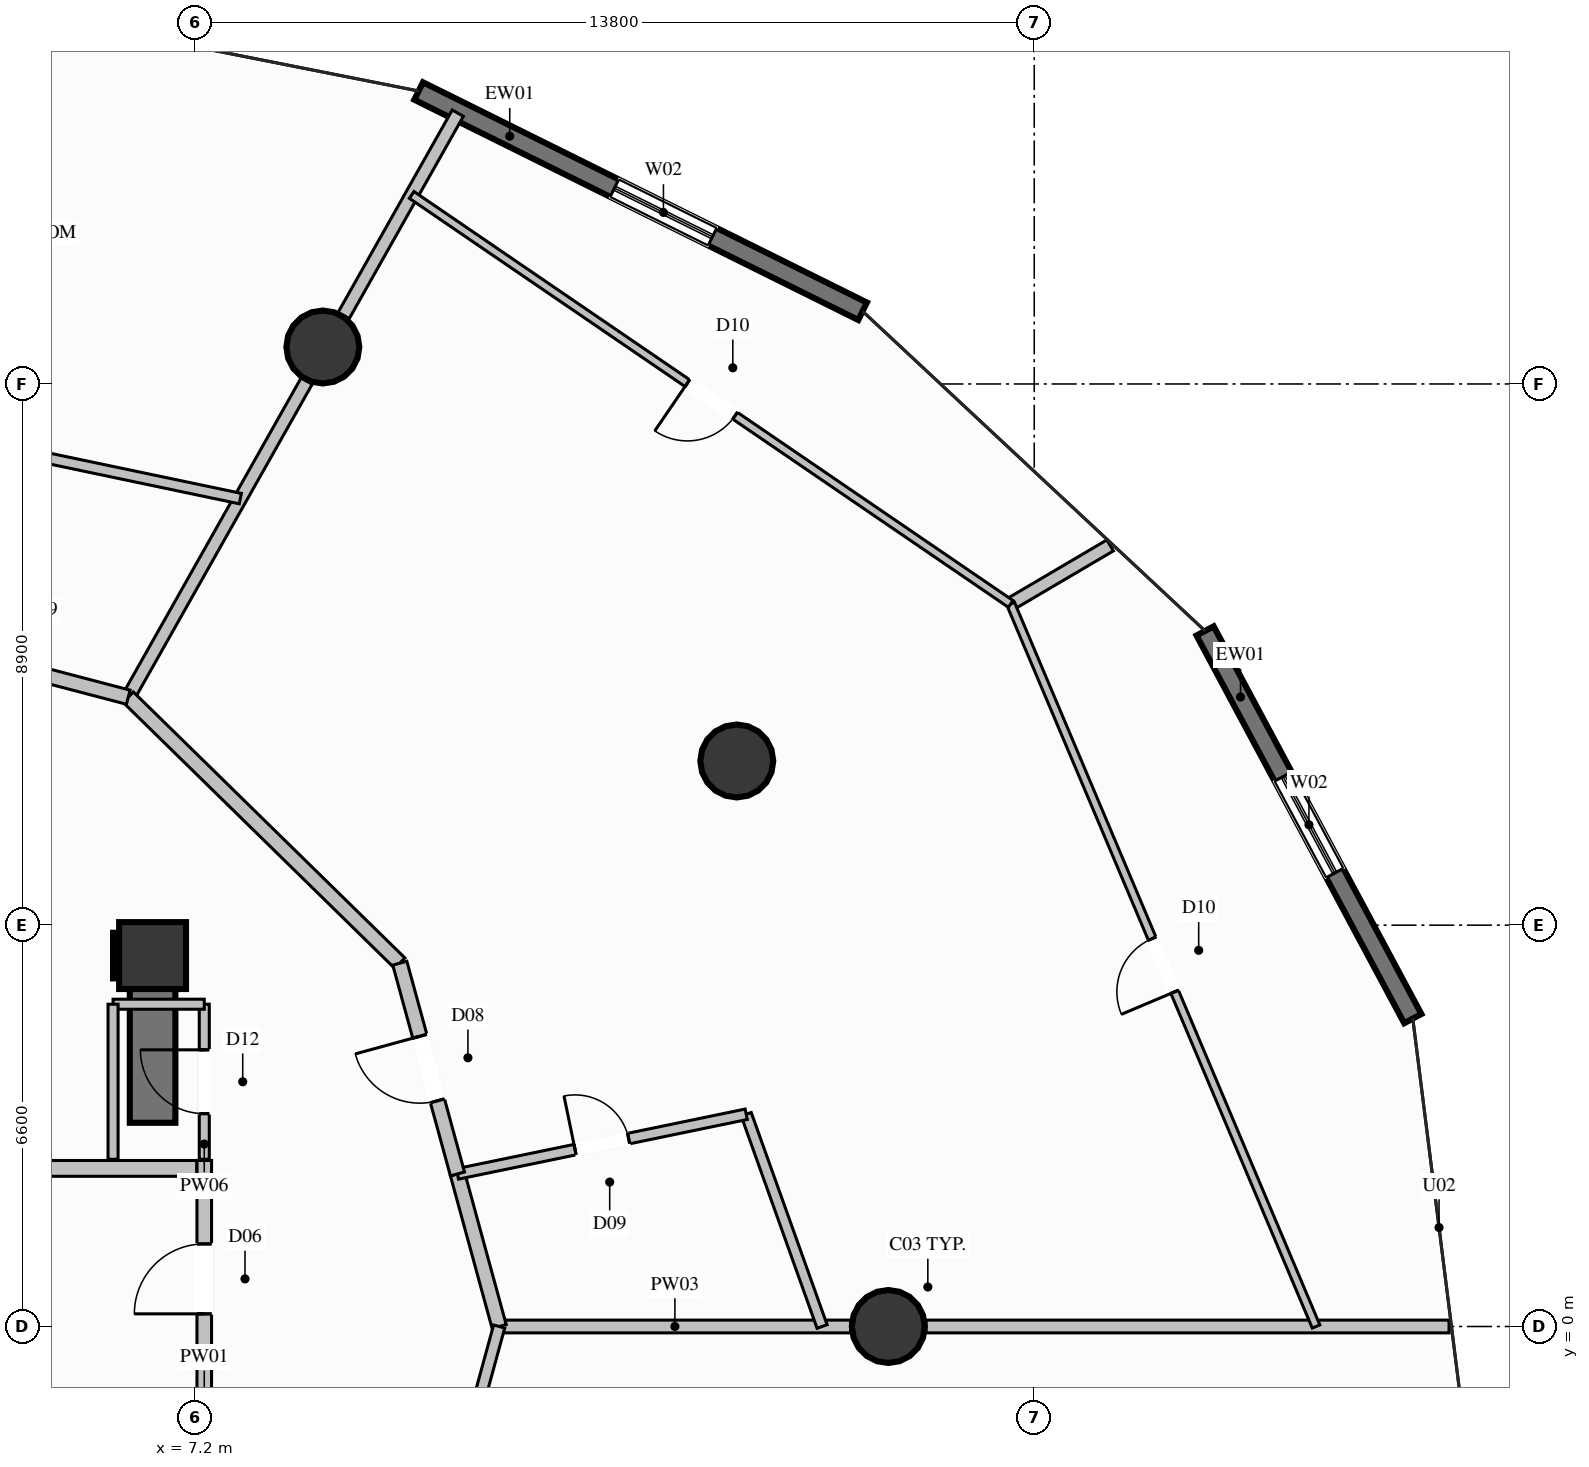
"""IFC4 building model, lengths in metres.
Left out: names, types, materials, properties, quantities, classifications, styles, units other than length and angle.
Written with IfcOpenShell. Run it as: python <this file> out.ifc"""

import sys

from ifc_helpers import new_model, si_unit, direction, frame, frame_2d, origin, origin_2d, place, context, subcontext, project, spatial, rectangle, circle, extrude, element, fill, save


model = new_model("IFC4")
c1 = context("Model", 3, precision=1e-05, world=origin(), true_north=direction((0.0, 1.0)))
c2 = subcontext(c1, "Body", "Model", "MODEL_VIEW")
j1 = project(units=[si_unit("LENGTHUNIT", "METRE"), si_unit("PLANEANGLEUNIT", "RADIAN")], contexts=[c1])
p1 = place(None, origin())
s1 = spatial("IfcSite", under=j1, at=p1, CompositionType="ELEMENT")
p2 = place(p1, origin())
s2 = spatial("IfcBuilding", under=s1, at=p2, CompositionType="ELEMENT")
p3 = place(p2, frame((0.0, 0.0, 35.6)))
s3 = spatial("IfcBuildingStorey", under=s2, at=p3, CompositionType="ELEMENT", Elevation=35.6)
p4 = place(p3, frame((6.5, 6.1, 0.0), z_axis=(0.0, 0.0, 1.0), x_axis=(1.0, 0.0, 0.0)))
e1 = element("IfcColumn", 1, at=p4, inside=s3, PredefinedType="COLUMN", context=c2, shape_type="SweptSolid", body=[
    extrude(rectangle(XDim=1.1, YDim=1.1, at=origin_2d()), origin(), (0.0, 0.0, 1.0), 3.6),
])
p5 = place(p3, frame((5.85, 6.1, 0.0), z_axis=(0.0, 0.0, 1.0), x_axis=(1.0, 0.0, 0.0)))
e2 = element("IfcWall", 2, at=p5, inside=s3, PredefinedType="SHEAR", context=c2, shape_type="SweptSolid", body=[
    extrude(rectangle(XDim=0.275, YDim=0.75, at=frame_2d((0.137, 0.0))), origin(), (0.0, 0.0, 1.0), 3.6),
])
p6 = place(p3, frame((6.5, 3.35, 0.0), z_axis=(0.0, 0.0, 1.0), x_axis=(0.0, 1.0, 0.0)))
e3 = element("IfcWall", 3, at=p6, inside=s3, PredefinedType="SHEAR", context=c2, shape_type="SweptSolid", body=[
    extrude(rectangle(XDim=3.125, YDim=0.75, at=frame_2d((1.562, 0.0))), origin(), (0.0, 0.0, 1.0), 3.6),
])
for number, where, z_axis, x_axis in (
    (4, (18.6, 0.0, 0.0), (0.0, 0.0, 1.0), (1.0, 0.0, 0.0)),
    (5, (16.108, 9.3, 0.0), (0.0, 0.0, 1.0), (1.0, 0.0, 0.0)),
    (6, (9.3, 16.108, 0.0), (0.0, 0.0, 1.0), (1.0, 0.0, 0.0)),
):
    element("IfcColumn", number, at=place(p3, frame(where, z_axis=z_axis, x_axis=x_axis)), inside=s3, PredefinedType="COLUMN", context=c2, shape_type="SweptSolid", body=[
        extrude(circle(Radius=0.6, at=origin_2d()), origin(), (0.0, 0.0, 1.0), 3.6),
    ])
p7 = place(p3, frame((23.81, 11.439, 0.0), z_axis=(0.0, 0.0, 1.0), x_axis=(0.472255130515, -0.881461905985, 0.0)))
e7 = element("IfcWall", 7, at=p7, inside=s3, PredefinedType="SOLIDWALL", context=c2, shape_type="SweptSolid", body=[
    extrude(rectangle(XDim=7.233, YDim=0.32, at=frame_2d((3.617, 0.0))), origin(), (0.0, 0.0, 1.0), 3.34),
])
p8 = place(p7, frame((2.717, 0.0, 0.35)))
e8 = element("IfcOpeningElement", 8, at=p8, cuts=e7, PredefinedType="OPENING", context=c2, shape_type="SweptSolid", body=[
    extrude(rectangle(XDim=1.8, YDim=2.6, at=frame_2d((0.9, 1.3))), frame((0.0, 0.17, 0.0), z_axis=(0.0, -1.0, 0.0), x_axis=(1.0, 0.0, 0.0)), (0.0, 0.0, 1.0), 0.34),
])
p9 = place(p3, frame((10.876, 20.318, 0.0), z_axis=(0.0, 0.0, 1.0), x_axis=(0.895818759339, -0.444419565743, 0.0)))
e9 = element("IfcWall", 9, at=p9, inside=s3, PredefinedType="SOLIDWALL", context=c2, shape_type="SweptSolid", body=[
    extrude(rectangle(XDim=8.15, YDim=0.32, at=frame_2d((4.075, 0.0))), origin(), (0.0, 0.0, 1.0), 3.34),
])
p10 = place(p9, frame((3.594, 0.0, 0.35)))
e10 = element("IfcOpeningElement", 10, at=p10, cuts=e9, PredefinedType="OPENING", context=c2, shape_type="SweptSolid", body=[
    extrude(rectangle(XDim=1.8, YDim=2.6, at=frame_2d((0.9, 1.3))), frame((0.0, 0.17, 0.0), z_axis=(0.0, -1.0, 0.0), x_axis=(1.0, 0.0, 0.0)), (0.0, 0.0, 1.0), 0.34),
])
p11 = place(p3, frame((7.35, -2.34, 0.0), z_axis=(0.0, 0.0, 1.0), x_axis=(0.0, 1.0, 0.0)))
e11 = element("IfcWall", 11, at=p11, inside=s3, PredefinedType="PARTITIONING", context=c2, shape_type="SweptSolid", body=[
    extrude(rectangle(XDim=5.07, YDim=0.24, at=frame_2d((2.535, 0.0))), origin(), (0.0, 0.0, 1.0), 2.425),
])
p12 = place(p11, frame((2.548, 0.0, 0.0)))
e12 = element("IfcOpeningElement", 12, at=p12, cuts=e11, PredefinedType="OPENING", context=c2, shape_type="SweptSolid", body=[
    extrude(rectangle(XDim=1.15, YDim=2.2, at=frame_2d((0.575, 1.1))), frame((0.0, 0.13, 0.0), z_axis=(0.0, -1.0, 0.0), x_axis=(1.0, 0.0, 0.0)), (0.0, 0.0, 1.0), 0.26),
])
p13 = place(p3, frame((4.13, 2.6, 0.0), z_axis=(0.0, 0.0, 1.0), x_axis=(1.0, 0.0, 0.0)))
e13 = element("IfcWall", 13, at=p13, inside=s3, PredefinedType="PARTITIONING", context=c2, shape_type="SweptSolid", body=[
    extrude(rectangle(XDim=3.095, YDim=0.26, at=frame_2d((1.548, 0.0))), origin(), (0.0, 0.0, 1.0), 3.34),
])
p14 = place(p3, frame((7.35, 2.75, 0.0), z_axis=(0.0, 0.0, 1.0), x_axis=(0.0, 1.0, 0.0)))
e14 = element("IfcWall", 14, at=p14, inside=s3, PredefinedType="PARTITIONING", context=c2, shape_type="SweptSolid", body=[
    extrude(rectangle(XDim=2.55, YDim=0.165, at=frame_2d((1.275, 0.0))), origin(), (0.0, 0.0, 1.0), 3.34),
])
p15 = place(p14, frame((0.75, 0.0, 0.0)))
e15 = element("IfcOpeningElement", 15, at=p15, cuts=e14, PredefinedType="OPENING", context=c2, shape_type="SweptSolid", body=[
    extrude(rectangle(XDim=1.05, YDim=2.15, at=frame_2d((0.525, 1.075))), frame((0.0, 0.093, 0.0), z_axis=(0.0, -1.0, 0.0), x_axis=(1.0, 0.0, 0.0)), (0.0, 0.0, 1.0), 0.185),
])
p16 = place(p3, frame((7.35, 5.3, 0.0), z_axis=(0.0, 0.0, 1.0), x_axis=(-1.0, 0.0, 0.0)))
e16 = element("IfcWall", 16, at=p16, inside=s3, PredefinedType="PARTITIONING", context=c2, shape_type="SweptSolid", body=[
    extrude(rectangle(XDim=1.5, YDim=0.165, at=frame_2d((0.75, 0.0))), origin(), (0.0, 0.0, 1.0), 2.425),
])
p17 = place(p3, frame((5.85, 5.3, 0.0), z_axis=(0.0, 0.0, 1.0), x_axis=(0.0, -1.0, 0.0)))
e17 = element("IfcWall", 17, at=p17, inside=s3, PredefinedType="PARTITIONING", context=c2, shape_type="SweptSolid", body=[
    extrude(rectangle(XDim=2.55, YDim=0.165, at=frame_2d((1.275, 0.0))), origin(), (0.0, 0.0, 1.0), 2.425),
])
p18 = place(p3, frame((12.2, 0.0, 0.0), z_axis=(0.0, 0.0, 1.0), x_axis=(1.0, 0.0, 0.0)))
e18 = element("IfcWall", 18, at=p18, inside=s3, PredefinedType="PARTITIONING", context=c2, shape_type="SweptSolid", body=[
    extrude(rectangle(XDim=5.78, YDim=0.21, at=frame_2d((2.89, 0.0))), origin(), (0.0, 0.0, 1.0), 2.707),
])
p19 = place(p3, frame((19.22, 0.0, 0.0), z_axis=(0.0, 0.0, 1.0), x_axis=(1.0, 0.0, 0.0)))
e19 = element("IfcWall", 19, at=p19, inside=s3, PredefinedType="PARTITIONING", context=c2, shape_type="SweptSolid", body=[
    extrude(rectangle(XDim=8.602, YDim=0.21, at=frame_2d((4.301, 0.0))), origin(), (0.0, 0.0, 1.0), 3.34),
])
p20 = place(p3, frame((6.1, 10.349, 0.0), z_axis=(0.0, 0.0, 1.0), x_axis=(0.491458802648, 0.870900824032, 0.0)))
e20 = element("IfcWall", 20, at=p20, inside=s3, PredefinedType="PARTITIONING", context=c2, shape_type="SweptSolid", body=[
    extrude(rectangle(XDim=5.97, YDim=0.21, at=frame_2d((2.985, 0.0))), origin(), (0.0, 0.0, 1.0), 2.707),
])
p21 = place(p3, frame((9.642, 16.625, 0.0), z_axis=(0.0, 0.0, 1.0), x_axis=(0.491316217202, 0.870981271161, 0.0)))
e21 = element("IfcWall", 21, at=p21, inside=s3, PredefinedType="PARTITIONING", context=c2, shape_type="SweptSolid", body=[
    extrude(rectangle(XDim=3.822, YDim=0.21, at=frame_2d((1.911, 0.0))), origin(), (0.0, 0.0, 1.0), 3.34),
])
p22 = place(p3, frame((12.2, 0.0, 0.0), z_axis=(0.0, 0.0, 1.0), x_axis=(-0.263744763784, 0.964592504416, 0.0)))
e22 = element("IfcWall", 22, at=p22, inside=s3, PredefinedType="PARTITIONING", context=c2, shape_type="SweptSolid", body=[
    extrude(rectangle(XDim=2.601, YDim=0.24, at=frame_2d((1.301, 0.0))), origin(), (0.0, 0.0, 1.0), 2.917),
])
p23 = place(p3, frame((17.511, 0.0, 0.0), z_axis=(0.0, 0.0, 1.0), x_axis=(-0.336724431673, 0.94160323763, 0.0)))
e23 = element("IfcWall", 23, at=p23, inside=s3, PredefinedType="PLUMBINGWALL", context=c2, shape_type="SweptSolid", body=[
    extrude(rectangle(XDim=3.707, YDim=0.175, at=frame_2d((1.853, 0.0))), origin(), (0.0, 0.0, 1.0), 3.34),
])
p24 = place(p3, frame((11.514, 2.509, 0.0), z_axis=(0.0, 0.0, 1.0), x_axis=(0.979325812174, 0.202289281992, 0.0)))
e24 = element("IfcWall", 24, at=p24, inside=s3, PredefinedType="PLUMBINGWALL", context=c2, shape_type="SweptSolid", body=[
    extrude(rectangle(XDim=4.849, YDim=0.175, at=frame_2d((2.425, 0.0))), origin(), (0.0, 0.0, 1.0), 3.34),
])
p25 = place(p24, frame((1.975, 0.0, 0.0)))
e25 = element("IfcOpeningElement", 25, at=p25, cuts=e24, PredefinedType="OPENING", context=c2, shape_type="SweptSolid", body=[
    extrude(rectangle(XDim=0.9, YDim=2.1, at=frame_2d((0.45, 1.05))), frame((0.0, 0.098, 0.0), z_axis=(0.0, -1.0, 0.0), x_axis=(1.0, 0.0, 0.0)), (0.0, 0.0, 1.0), 0.195),
])
p26 = place(p3, frame((20.613, 11.883, 0.0), z_axis=(0.0, 0.0, 1.0), x_axis=(0.861901128596, 0.507076369519, 0.0)))
e26 = element("IfcWall", 26, at=p26, inside=s3, PredefinedType="PARTITIONING", context=c2, shape_type="SweptSolid", body=[
    extrude(rectangle(XDim=1.897, YDim=0.21, at=frame_2d((0.948, 0.0))), origin(), (0.0, 0.0, 1.0), 3.34),
])
p27 = place(p3, frame((10.566, 5.975, 0.0), z_axis=(0.0, 0.0, 1.0), x_axis=(-0.714411174131, 0.699726142342, 0.0)))
e27 = element("IfcWall", 27, at=p27, inside=s3, PredefinedType="PARTITIONING", context=c2, shape_type="SweptSolid", body=[
    extrude(rectangle(XDim=6.251, YDim=0.24, at=frame_2d((3.125, 0.0))), origin(), (0.0, 0.0, 1.0), 3.34),
])
p28 = place(p3, frame((11.514, 2.509, 0.0), z_axis=(0.0, 0.0, 1.0), x_axis=(-0.263818706543, 0.96457228349, 0.0)))
e28 = element("IfcWall", 28, at=p28, inside=s3, PredefinedType="PARTITIONING", context=c2, shape_type="SweptSolid", body=[
    extrude(rectangle(XDim=3.593, YDim=0.24, at=frame_2d((1.797, 0.0))), origin(), (0.0, 0.0, 1.0), 2.917),
])
p29 = place(p28, frame((1.247, 0.0, 0.0)))
e29 = element("IfcOpeningElement", 29, at=p29, cuts=e28, PredefinedType="OPENING", context=c2, shape_type="SweptSolid", body=[
    extrude(rectangle(XDim=1.1, YDim=2.3, at=frame_2d((0.55, 1.15))), frame((0.0, 0.13, 0.0), z_axis=(0.0, -1.0, 0.0), x_axis=(1.0, 0.0, 0.0)), (0.0, 0.0, 1.0), 0.26),
])
p30 = place(p3, frame((25.635, 0.0, 0.0), z_axis=(0.0, 0.0, 1.0), x_axis=(-0.389280036571, 0.921119456491, 0.0)))
e30 = element("IfcWall", 30, at=p30, inside=s3, PredefinedType="PARTITIONING", context=c2, shape_type="SweptSolid", body=[
    extrude(rectangle(XDim=12.901, YDim=0.135, at=frame_2d((6.45, 0.0))), origin(), (0.0, 0.0, 1.0), 3.34),
])
p31 = place(p30, frame((5.975, 0.0, 0.0)))
e31 = element("IfcOpeningElement", 31, at=p31, cuts=e30, PredefinedType="OPENING", context=c2, shape_type="SweptSolid", body=[
    extrude(rectangle(XDim=0.95, YDim=2.1, at=frame_2d((0.475, 1.05))), frame((0.0, 0.078, 0.0), z_axis=(0.0, -1.0, 0.0), x_axis=(1.0, 0.0, 0.0)), (0.0, 0.0, 1.0), 0.155),
])
p32 = place(p3, frame((20.613, 11.883, 0.0), z_axis=(0.0, 0.0, 1.0), x_axis=(-0.825894658533, 0.563824452295, 0.0)))
e32 = element("IfcWall", 32, at=p32, inside=s3, PredefinedType="PARTITIONING", context=c2, shape_type="SweptSolid", body=[
    extrude(rectangle(XDim=11.929, YDim=0.135, at=frame_2d((5.964, 0.0))), origin(), (0.0, 0.0, 1.0), 3.34),
])
p33 = place(p32, frame((5.489, 0.0, 0.0)))
e33 = element("IfcOpeningElement", 33, at=p33, cuts=e32, PredefinedType="OPENING", context=c2, shape_type="SweptSolid", body=[
    extrude(rectangle(XDim=0.95, YDim=2.1, at=frame_2d((0.475, 1.05))), frame((0.0, 0.078, 0.0), z_axis=(0.0, -1.0, 0.0), x_axis=(1.0, 0.0, 0.0)), (0.0, 0.0, 1.0), 0.155),
])
p34 = place(p3, frame((6.1, 10.349, 0.0), z_axis=(0.0, 0.0, 1.0), x_axis=(-0.967291490053, 0.253667446219, 0.0)))
e34 = element("IfcWall", 34, at=p34, inside=s3, PredefinedType="PARTITIONING", context=c2, shape_type="SweptSolid", body=[
    extrude(rectangle(XDim=2.649, YDim=0.24, at=frame_2d((1.324, 0.0))), origin(), (0.0, 0.0, 1.0), 3.34),
])
p35 = place(p3, frame((7.943, 13.615, 0.0), z_axis=(0.0, 0.0, 1.0), x_axis=(-0.978691652986, 0.205335453283, 0.0)))
e35 = element("IfcWall", 35, at=p35, inside=s3, PredefinedType="PLUMBINGWALL", context=c2, shape_type="SweptSolid", body=[
    extrude(rectangle(XDim=3.409, YDim=0.175, at=frame_2d((1.705, 0.0))), origin(), (0.0, 0.0, 1.0), 3.34),
])
p36 = place(p3, frame((10.566, -5.975, 0.0), z_axis=(0.0, 0.0, 1.0), x_axis=(0.263787657435, 0.964580775148, 0.0)))
e36 = element("IfcWall", 36, at=p36, inside=s3, PredefinedType="PARTITIONING", context=c2, shape_type="SweptSolid", body=[
    extrude(rectangle(XDim=6.195, YDim=0.19, at=frame_2d((3.097, 0.0))), origin(), (0.0, 0.0, 1.0), 2.917),
])
p37 = place(p36, frame((2.622, 0.0, 0.0)))
e37 = element("IfcOpeningElement", 37, at=p37, cuts=e36, PredefinedType="OPENING", context=c2, shape_type="SweptSolid", body=[
    extrude(rectangle(XDim=0.95, YDim=2.1, at=frame_2d((0.475, 1.05))), frame((0.0, 0.105, 0.0), z_axis=(0.0, -1.0, 0.0), x_axis=(1.0, 0.0, 0.0)), (0.0, 0.0, 1.0), 0.21),
])
p38 = place(p8, origin())
e38 = element("IfcWindow", 38, at=p38, inside=s3, PartitioningType="SINGLE_PANEL", PredefinedType="WINDOW", context=c2, shape_type="SweptSolid", body=[
    extrude(rectangle(XDim=1.8, YDim=2.6, at=frame_2d((0.9, 1.3))), frame((0.0, 0.03, 0.0), z_axis=(0.0, -1.0, 0.0), x_axis=(1.0, 0.0, 0.0)), (0.0, 0.0, 1.0), 0.06),
])
fill(e8, e38)
p39 = place(p10, origin())
e39 = element("IfcWindow", 39, at=p39, inside=s3, PartitioningType="SINGLE_PANEL", PredefinedType="WINDOW", context=c2, shape_type="SweptSolid", body=[
    extrude(rectangle(XDim=1.8, YDim=2.6, at=frame_2d((0.9, 1.3))), frame((0.0, 0.03, 0.0), z_axis=(0.0, -1.0, 0.0), x_axis=(1.0, 0.0, 0.0)), (0.0, 0.0, 1.0), 0.06),
])
fill(e10, e39)
p40 = place(p12, origin())
e40 = element("IfcDoor", 40, at=p40, inside=s3, OperationType="SINGLE_SWING_LEFT", PredefinedType="DOOR", context=c2, shape_type="SweptSolid", body=[
    extrude(rectangle(XDim=1.15, YDim=2.2, at=frame_2d((0.575, 1.1))), frame((0.0, 0.025, 0.0), z_axis=(0.0, -1.0, 0.0), x_axis=(1.0, 0.0, 0.0)), (0.0, 0.0, 1.0), 0.05),
])
fill(e12, e40)
p41 = place(p15, origin())
e41 = element("IfcDoor", 41, at=p41, inside=s3, OperationType="SINGLE_SWING_RIGHT", PredefinedType="DOOR", context=c2, shape_type="SweptSolid", body=[
    extrude(rectangle(XDim=1.05, YDim=2.15, at=frame_2d((0.525, 1.075))), frame((0.0, 0.025, 0.0), z_axis=(0.0, -1.0, 0.0), x_axis=(1.0, 0.0, 0.0)), (0.0, 0.0, 1.0), 0.05),
])
fill(e15, e41)
p42 = place(p25, origin())
e42 = element("IfcDoor", 42, at=p42, inside=s3, OperationType="SINGLE_SWING_LEFT", PredefinedType="DOOR", context=c2, shape_type="SweptSolid", body=[
    extrude(rectangle(XDim=0.9, YDim=2.1, at=frame_2d((0.45, 1.05))), frame((0.0, 0.025, 0.0), z_axis=(0.0, -1.0, 0.0), x_axis=(1.0, 0.0, 0.0)), (0.0, 0.0, 1.0), 0.05),
])
fill(e25, e42)
p43 = place(p29, origin())
e43 = element("IfcDoor", 43, at=p43, inside=s3, OperationType="SINGLE_SWING_RIGHT", PredefinedType="DOOR", context=c2, shape_type="SweptSolid", body=[
    extrude(rectangle(XDim=1.1, YDim=2.3, at=frame_2d((0.55, 1.15))), frame((0.0, 0.025, 0.0), z_axis=(0.0, -1.0, 0.0), x_axis=(1.0, 0.0, 0.0)), (0.0, 0.0, 1.0), 0.05),
])
fill(e29, e43)
p44 = place(p31, origin())
e44 = element("IfcDoor", 44, at=p44, inside=s3, OperationType="SINGLE_SWING_LEFT", PredefinedType="DOOR", context=c2, shape_type="SweptSolid", body=[
    extrude(rectangle(XDim=0.95, YDim=2.1, at=frame_2d((0.475, 1.05))), frame((0.0, 0.025, 0.0), z_axis=(0.0, -1.0, 0.0), x_axis=(1.0, 0.0, 0.0)), (0.0, 0.0, 1.0), 0.05),
])
fill(e31, e44)
p45 = place(p33, origin())
e45 = element("IfcDoor", 45, at=p45, inside=s3, OperationType="SINGLE_SWING_RIGHT", PredefinedType="DOOR", context=c2, shape_type="SweptSolid", body=[
    extrude(rectangle(XDim=0.95, YDim=2.1, at=frame_2d((0.475, 1.05))), frame((0.0, 0.025, 0.0), z_axis=(0.0, -1.0, 0.0), x_axis=(1.0, 0.0, 0.0)), (0.0, 0.0, 1.0), 0.05),
])
fill(e33, e45)
save(model, sys.argv[1])
